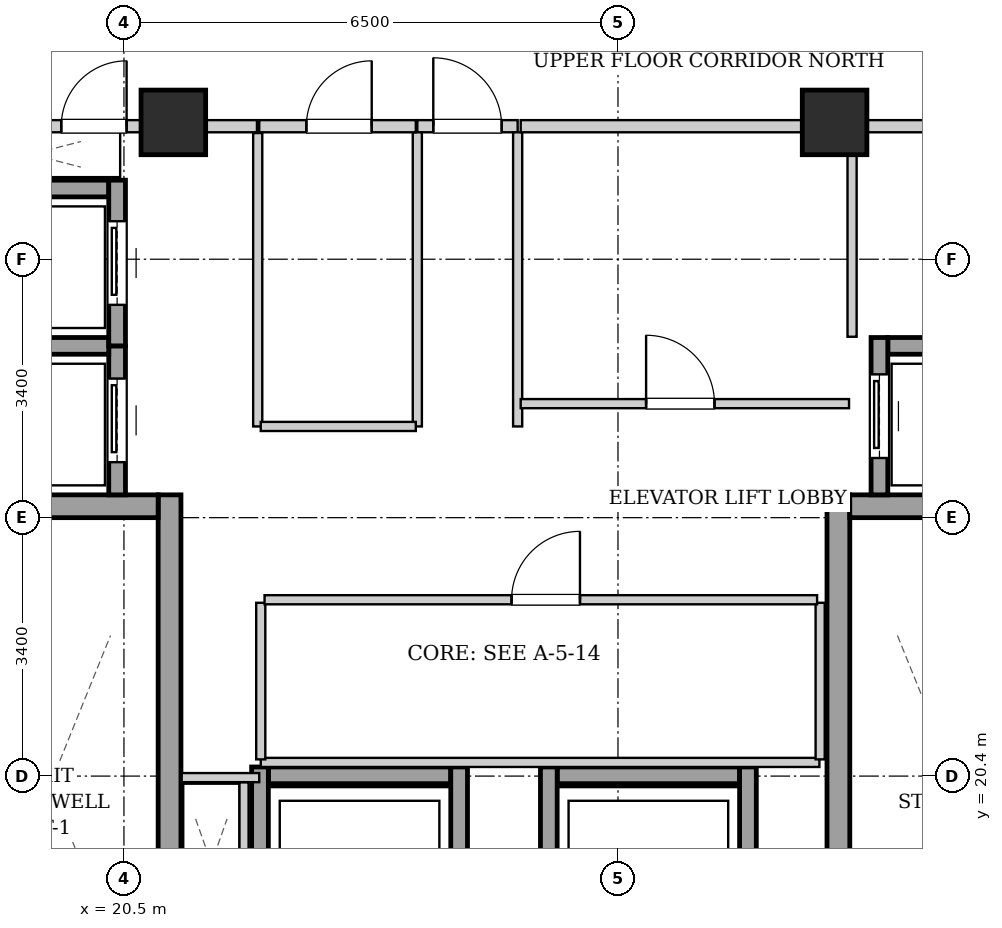
"""IFC4 building model, lengths in metres.
Left out: names, types, materials, properties, quantities, classifications, styles, units other than length and angle.
Written with IfcOpenShell. Run it as: python <this file> out.ifc"""

import sys

from ifc_helpers import new_model, si_unit, direction, frame, frame_2d, origin, origin_2d, place, context, subcontext, project, spatial, rectangle, extrude, element, fill, save


model = new_model("IFC4")
c1 = context("Model", 3, precision=1e-05, world=origin(), true_north=direction((0.0, 1.0)))
c2 = subcontext(c1, "Body", "Model", "MODEL_VIEW")
j1 = project(units=[si_unit("LENGTHUNIT", "METRE"), si_unit("PLANEANGLEUNIT", "RADIAN")], contexts=[c1])
p1 = place(None, origin())
s1 = spatial("IfcSite", under=j1, at=p1, CompositionType="ELEMENT")
p2 = place(p1, origin())
s2 = spatial("IfcBuilding", under=s1, at=p2, CompositionType="ELEMENT")
p3 = place(p2, frame((0.0, 0.0, 207.4)))
s3 = spatial("IfcBuildingStorey", under=s2, at=p3, CompositionType="ELEMENT", Elevation=207.4)
for number, where, z_axis, x_axis in (
    (1, (21.15, 29.0, 0.0), (0.0, 0.0, 1.0), (1.0, 0.0, 0.0)),
    (2, (29.85, 29.0, 0.0), (0.0, 0.0, 1.0), (1.0, 0.0, 0.0)),
):
    element("IfcColumn", number, at=place(p3, frame(where, z_axis=z_axis, x_axis=x_axis)), inside=s3, PredefinedType="COLUMN", context=c2, shape_type="SweptSolid", body=[
        extrude(rectangle(XDim=0.85, YDim=0.85, at=origin_2d()), origin(), (0.0, 0.0, 1.0), 3.3),
    ])
p4 = place(p3, frame((21.1, 15.1, 0.0), z_axis=(0.0, 0.0, 1.0), x_axis=(0.0, 1.0, 0.0)))
e3 = element("IfcWall", 3, at=p4, inside=s3, PredefinedType="SHEAR", context=c2, shape_type="SweptSolid", body=[
    extrude(rectangle(XDim=9.0, YDim=0.3, at=frame_2d((4.5, 0.0))), origin(), (0.0, 0.0, 1.0), 3.04),
])
p5 = place(p3, frame((18.1, 23.95, 0.0), z_axis=(0.0, 0.0, 1.0), x_axis=(1.0, 0.0, 0.0)))
e4 = element("IfcWall", 4, at=p5, inside=s3, PredefinedType="SHEAR", context=c2, shape_type="SweptSolid", body=[
    extrude(rectangle(XDim=2.85, YDim=0.3, at=frame_2d((1.425, 0.0))), origin(), (0.0, 0.0, 1.0), 3.04),
])
p6 = place(p3, frame((29.9, 15.1, 0.0), z_axis=(0.0, 0.0, 1.0), x_axis=(0.0, 1.0, 0.0)))
e5 = element("IfcWall", 5, at=p6, inside=s3, PredefinedType="SHEAR", context=c2, shape_type="SweptSolid", body=[
    extrude(rectangle(XDim=9.0, YDim=0.3, at=frame_2d((4.5, 0.0))), origin(), (0.0, 0.0, 1.0), 3.04),
])
p7 = place(p3, frame((30.05, 23.95, 0.0), z_axis=(0.0, 0.0, 1.0), x_axis=(1.0, 0.0, 0.0)))
e6 = element("IfcWall", 6, at=p7, inside=s3, PredefinedType="SHEAR", context=c2, shape_type="SweptSolid", body=[
    extrude(rectangle(XDim=2.85, YDim=0.3, at=frame_2d((1.425, 0.0))), origin(), (0.0, 0.0, 1.0), 3.04),
])
p8 = place(p3, frame((20.41, 24.1, 0.0), z_axis=(0.0, 0.0, 1.0), x_axis=(0.0, 1.0, 0.0)))
e7 = element("IfcWall", 7, at=p8, inside=s3, PredefinedType="SHEAR", context=c2, shape_type="SweptSolid", body=[
    extrude(rectangle(XDim=1.96, YDim=0.22, at=frame_2d((0.98, 0.0))), origin(), (0.0, 0.0, 1.0), 3.04),
])
p9 = place(p8, frame((0.43, 0.0, 0.0)))
e8 = element("IfcOpeningElement", 8, at=p9, cuts=e7, PredefinedType="OPENING", context=c2, shape_type="SweptSolid", body=[
    extrude(rectangle(XDim=1.1, YDim=2.15, at=frame_2d((0.55, 1.075))), frame((0.0, 0.12, 0.0), z_axis=(0.0, -1.0, 0.0), x_axis=(1.0, 0.0, 0.0)), (0.0, 0.0, 1.0), 0.24),
])
for number, where, z_axis, x_axis in (
    (9, (18.4, 26.06, 0.0), (0.0, 0.0, 1.0), (1.0, 0.0, 0.0)),
    (10, (18.4, 28.13, 0.0), (0.0, 0.0, 1.0), (1.0, 0.0, 0.0)),
):
    element("IfcWall", number, at=place(p3, frame(where, z_axis=z_axis, x_axis=x_axis)), inside=s3, PredefinedType="SHEAR", context=c2, shape_type="SweptSolid", body=[
        extrude(rectangle(XDim=1.9, YDim=0.22, at=frame_2d((0.95, 0.0))), origin(), (0.0, 0.0, 1.0), 3.04),
    ])
p10 = place(p3, frame((20.41, 26.06, 0.0), z_axis=(0.0, 0.0, 1.0), x_axis=(0.0, 1.0, 0.0)))
e11 = element("IfcWall", 11, at=p10, inside=s3, PredefinedType="SHEAR", context=c2, shape_type="SweptSolid", body=[
    extrude(rectangle(XDim=2.18, YDim=0.22, at=frame_2d((1.09, 0.0))), origin(), (0.0, 0.0, 1.0), 3.04),
])
p11 = place(p10, frame((0.54, 0.0, 0.0)))
e12 = element("IfcOpeningElement", 12, at=p11, cuts=e11, PredefinedType="OPENING", context=c2, shape_type="SweptSolid", body=[
    extrude(rectangle(XDim=1.1, YDim=2.15, at=frame_2d((0.55, 1.075))), frame((0.0, 0.12, 0.0), z_axis=(0.0, -1.0, 0.0), x_axis=(1.0, 0.0, 0.0)), (0.0, 0.0, 1.0), 0.24),
])
p12 = place(p3, frame((30.55, 26.06, 0.0), z_axis=(0.0, 0.0, 1.0), x_axis=(1.0, 0.0, 0.0)))
e13 = element("IfcWall", 13, at=p12, inside=s3, PredefinedType="SHEAR", context=c2, shape_type="SweptSolid", body=[
    extrude(rectangle(XDim=1.9, YDim=0.22, at=frame_2d((0.95, 0.0))), origin(), (0.0, 0.0, 1.0), 3.04),
])
p13 = place(p3, frame((30.44, 24.1, 0.0), z_axis=(0.0, 0.0, 1.0), x_axis=(0.0, 1.0, 0.0)))
e14 = element("IfcWall", 14, at=p13, inside=s3, PredefinedType="SHEAR", context=c2, shape_type="SweptSolid", body=[
    extrude(rectangle(XDim=2.07, YDim=0.22, at=frame_2d((1.035, 0.0))), origin(), (0.0, 0.0, 1.0), 3.04),
])
p14 = place(p13, frame((0.485, 0.0, 0.0)))
e15 = element("IfcOpeningElement", 15, at=p14, cuts=e14, PredefinedType="OPENING", context=c2, shape_type="SweptSolid", body=[
    extrude(rectangle(XDim=1.1, YDim=2.15, at=frame_2d((0.55, 1.075))), frame((0.0, 0.12, 0.0), z_axis=(0.0, -1.0, 0.0), x_axis=(1.0, 0.0, 0.0)), (0.0, 0.0, 1.0), 0.24),
])
p15 = place(p3, frame((22.4, 20.41, 0.0), z_axis=(0.0, 0.0, 1.0), x_axis=(1.0, 0.0, 0.0)))
e16 = element("IfcWall", 16, at=p15, inside=s3, PredefinedType="SHEAR", context=c2, shape_type="SweptSolid", body=[
    extrude(rectangle(XDim=2.4, YDim=0.22, at=frame_2d((1.2, 0.0))), origin(), (0.0, 0.0, 1.0), 3.04),
])
for number, where, z_axis, x_axis in (
    (17, (22.29, 17.98, 0.0), (0.0, 0.0, 1.0), (0.0, 1.0, 0.0)),
    (18, (24.91, 17.98, 0.0), (0.0, 0.0, 1.0), (0.0, 1.0, 0.0)),
):
    element("IfcWall", number, at=place(p3, frame(where, z_axis=z_axis, x_axis=x_axis)), inside=s3, PredefinedType="SHEAR", context=c2, shape_type="SweptSolid", body=[
        extrude(rectangle(XDim=2.54, YDim=0.22, at=frame_2d((1.27, 0.0))), origin(), (0.0, 0.0, 1.0), 3.04),
    ])
p16 = place(p3, frame((26.2, 20.41, 0.0), z_axis=(0.0, 0.0, 1.0), x_axis=(1.0, 0.0, 0.0)))
e19 = element("IfcWall", 19, at=p16, inside=s3, PredefinedType="SHEAR", context=c2, shape_type="SweptSolid", body=[
    extrude(rectangle(XDim=2.4, YDim=0.22, at=frame_2d((1.2, 0.0))), origin(), (0.0, 0.0, 1.0), 3.04),
])
for number, where, z_axis, x_axis in (
    (20, (26.09, 17.98, 0.0), (0.0, 0.0, 1.0), (0.0, 1.0, 0.0)),
    (21, (28.71, 17.98, 0.0), (0.0, 0.0, 1.0), (0.0, 1.0, 0.0)),
):
    element("IfcWall", number, at=place(p3, frame(where, z_axis=z_axis, x_axis=x_axis)), inside=s3, PredefinedType="SHEAR", context=c2, shape_type="SweptSolid", body=[
        extrude(rectangle(XDim=2.54, YDim=0.22, at=frame_2d((1.27, 0.0))), origin(), (0.0, 0.0, 1.0), 3.04),
    ])
p17 = place(p3, frame((24.36, 28.95, 0.0), z_axis=(0.0, 0.0, 1.0), x_axis=(1.0, 0.0, 0.0)))
e22 = element("IfcWall", 22, at=p17, inside=s3, PredefinedType="PARTITIONING", context=c2, shape_type="SweptSolid", body=[
    extrude(rectangle(XDim=1.32, YDim=0.16, at=frame_2d((0.66, 0.0))), origin(), (0.0, 0.0, 1.0), 2.556),
])
p18 = place(p17, frame((0.21, 0.0, 0.0)))
e23 = element("IfcOpeningElement", 23, at=p18, cuts=e22, PredefinedType="OPENING", context=c2, shape_type="SweptSolid", body=[
    extrude(rectangle(XDim=0.9, YDim=2.05, at=frame_2d((0.45, 1.025))), frame((0.0, 0.09, 0.0), z_axis=(0.0, -1.0, 0.0), x_axis=(1.0, 0.0, 0.0)), (0.0, 0.0, 1.0), 0.18),
])
p19 = place(p3, frame((17.96, 28.95, 0.0), z_axis=(0.0, 0.0, 1.0), x_axis=(1.0, 0.0, 0.0)))
e24 = element("IfcWall", 24, at=p19, inside=s3, PredefinedType="PARTITIONING", context=c2, shape_type="SweptSolid", body=[
    extrude(rectangle(XDim=4.29, YDim=0.16, at=frame_2d((2.145, 0.0))), origin(), (0.0, 0.0, 1.0), 2.556),
])
p20 = place(p19, frame((1.715, 0.0, 0.0)))
e25 = element("IfcOpeningElement", 25, at=p20, cuts=e24, PredefinedType="OPENING", context=c2, shape_type="SweptSolid", body=[
    extrude(rectangle(XDim=0.86, YDim=2.05, at=frame_2d((0.43, 1.025))), frame((0.0, 0.09, 0.0), z_axis=(0.0, -1.0, 0.0), x_axis=(1.0, 0.0, 0.0)), (0.0, 0.0, 1.0), 0.18),
])
p21 = place(p3, frame((22.08, 18.2, 0.0), z_axis=(0.0, 0.0, 1.0), x_axis=(0.0, 1.0, 0.0)))
e26 = element("IfcWall", 26, at=p21, inside=s3, PredefinedType="PARTITIONING", context=c2, shape_type="SweptSolid", body=[
    extrude(rectangle(XDim=2.12, YDim=0.12, at=frame_2d((1.06, 0.0))), origin(), (0.0, 0.0, 1.0), 3.04),
])
p22 = place(p3, frame((22.28, 20.38, 0.0), z_axis=(0.0, 0.0, 1.0), x_axis=(-1.0, 0.0, 0.0)))
e27 = element("IfcWall", 27, at=p22, inside=s3, PredefinedType="PARTITIONING", context=c2, shape_type="SweptSolid", body=[
    extrude(rectangle(XDim=1.02, YDim=0.12, at=frame_2d((0.51, 0.0))), origin(), (0.0, 0.0, 1.0), 3.04),
])
for number, where, z_axis, x_axis in (
    (28, (24.36, 25.0, 0.0), (0.0, 0.0, 1.0), (0.0, 1.0, 0.0)),
    (29, (25.68, 25.0, 0.0), (0.0, 0.0, 1.0), (0.0, 1.0, 0.0)),
):
    element("IfcWall", number, at=place(p3, frame(where, z_axis=z_axis, x_axis=x_axis)), inside=s3, PredefinedType="PARTITIONING", context=c2, shape_type="SweptSolid", body=[
        extrude(rectangle(XDim=3.87, YDim=0.12, at=frame_2d((1.935, 0.0))), origin(), (0.0, 0.0, 1.0), 3.04),
    ])
p23 = place(p3, frame((30.08, 26.18, 0.0), z_axis=(0.0, 0.0, 1.0), x_axis=(0.0, 1.0, 0.0)))
e30 = element("IfcWall", 30, at=p23, inside=s3, PredefinedType="PARTITIONING", context=c2, shape_type="SweptSolid", body=[
    extrude(rectangle(XDim=2.68, YDim=0.12, at=frame_2d((1.34, 0.0))), origin(), (0.0, 0.0, 1.0), 3.04),
])
p24 = place(p3, frame((30.08, 28.95, 0.0), z_axis=(0.0, 0.0, 1.0), x_axis=(1.0, 0.0, 0.0)))
e31 = element("IfcWall", 31, at=p24, inside=s3, PredefinedType="PARTITIONING", context=c2, shape_type="SweptSolid", body=[
    extrude(rectangle(XDim=2.96, YDim=0.16, at=frame_2d((1.48, 0.0))), origin(), (0.0, 0.0, 1.0), 3.04),
])
p25 = place(p24, frame((1.045, 0.0, 0.0)))
e32 = element("IfcOpeningElement", 32, at=p25, cuts=e31, PredefinedType="OPENING", context=c2, shape_type="SweptSolid", body=[
    extrude(rectangle(XDim=0.86, YDim=2.05, at=frame_2d((0.43, 1.025))), frame((0.0, 0.09, 0.0), z_axis=(0.0, -1.0, 0.0), x_axis=(1.0, 0.0, 0.0)), (0.0, 0.0, 1.0), 0.18),
])
p26 = place(p3, frame((22.26, 25.0, 0.0), z_axis=(0.0, 0.0, 1.0), x_axis=(0.0, 1.0, 0.0)))
e33 = element("IfcWall", 33, at=p26, inside=s3, PredefinedType="PARTITIONING", context=c2, shape_type="SweptSolid", body=[
    extrude(rectangle(XDim=3.86, YDim=0.12, at=frame_2d((1.93, 0.0))), origin(), (0.0, 0.0, 1.0), 3.04),
])
p27 = place(p3, frame((22.3, 25.0, 0.0), z_axis=(0.0, 0.0, 1.0), x_axis=(1.0, 0.0, 0.0)))
e34 = element("IfcWall", 34, at=p27, inside=s3, PredefinedType="PARTITIONING", context=c2, shape_type="SweptSolid", body=[
    extrude(rectangle(XDim=2.04, YDim=0.12, at=frame_2d((1.02, 0.0))), origin(), (0.0, 0.0, 1.0), 3.04),
])
p28 = place(p3, frame((22.28, 28.95, 0.0), z_axis=(0.0, 0.0, 1.0), x_axis=(1.0, 0.0, 0.0)))
e35 = element("IfcWall", 35, at=p28, inside=s3, PredefinedType="PARTITIONING", context=c2, shape_type="SweptSolid", body=[
    extrude(rectangle(XDim=2.06, YDim=0.16, at=frame_2d((1.03, 0.0))), origin(), (0.0, 0.0, 1.0), 2.556),
])
p29 = place(p28, frame((0.62, 0.0, 0.0)))
e36 = element("IfcOpeningElement", 36, at=p29, cuts=e35, PredefinedType="OPENING", context=c2, shape_type="SweptSolid", body=[
    extrude(rectangle(XDim=0.86, YDim=2.05, at=frame_2d((0.43, 1.025))), frame((0.0, 0.09, 0.0), z_axis=(0.0, -1.0, 0.0), x_axis=(1.0, 0.0, 0.0)), (0.0, 0.0, 1.0), 0.18),
])
p30 = place(p3, frame((25.72, 28.95, 0.0), z_axis=(0.0, 0.0, 1.0), x_axis=(1.0, 0.0, 0.0)))
e37 = element("IfcWall", 37, at=p30, inside=s3, PredefinedType="PARTITIONING", context=c2, shape_type="SweptSolid", body=[
    extrude(rectangle(XDim=4.32, YDim=0.16, at=frame_2d((2.16, 0.0))), origin(), (0.0, 0.0, 1.0), 2.556),
])
p31 = place(p3, frame((25.72, 25.3, 0.0), z_axis=(0.0, 0.0, 1.0), x_axis=(1.0, 0.0, 0.0)))
e38 = element("IfcWall", 38, at=p31, inside=s3, PredefinedType="PARTITIONING", context=c2, shape_type="SweptSolid", body=[
    extrude(rectangle(XDim=4.32, YDim=0.12, at=frame_2d((2.16, 0.0))), origin(), (0.0, 0.0, 1.0), 3.04),
])
p32 = place(p31, frame((1.65, 0.0, 0.0)))
e39 = element("IfcOpeningElement", 39, at=p32, cuts=e38, PredefinedType="OPENING", context=c2, shape_type="SweptSolid", body=[
    extrude(rectangle(XDim=0.9, YDim=2.05, at=frame_2d((0.45, 1.025))), frame((0.0, 0.07, 0.0), z_axis=(0.0, -1.0, 0.0), x_axis=(1.0, 0.0, 0.0)), (0.0, 0.0, 1.0), 0.14),
])
p33 = place(p3, frame((22.3, 20.58, 0.0), z_axis=(0.0, 0.0, 1.0), x_axis=(1.0, 0.0, 0.0)))
e40 = element("IfcWall", 40, at=p33, inside=s3, PredefinedType="PARTITIONING", context=c2, shape_type="SweptSolid", body=[
    extrude(rectangle(XDim=7.35, YDim=0.12, at=frame_2d((3.675, 0.0))), origin(), (0.0, 0.0, 1.0), 3.04),
])
for number, where, z_axis, x_axis in (
    (41, (22.3, 20.62, 0.0), (0.0, 0.0, 1.0), (0.0, 1.0, 0.0)),
    (42, (29.66, 20.62, 0.0), (0.0, 0.0, 1.0), (0.0, 1.0, 0.0)),
):
    element("IfcWall", number, at=place(p3, frame(where, z_axis=z_axis, x_axis=x_axis)), inside=s3, PredefinedType="PARTITIONING", context=c2, shape_type="SweptSolid", body=[
        extrude(rectangle(XDim=2.06, YDim=0.12, at=frame_2d((1.03, 0.0))), origin(), (0.0, 0.0, 1.0), 3.04),
    ])
p34 = place(p3, frame((22.35, 22.72, 0.0), z_axis=(0.0, 0.0, 1.0), x_axis=(1.0, 0.0, 0.0)))
e43 = element("IfcWall", 43, at=p34, inside=s3, PredefinedType="PARTITIONING", context=c2, shape_type="SweptSolid", body=[
    extrude(rectangle(XDim=7.27, YDim=0.12, at=frame_2d((3.635, 0.0))), origin(), (0.0, 0.0, 1.0), 3.04),
])
p35 = place(p34, frame((3.25, 0.0, 0.0)))
e44 = element("IfcOpeningElement", 44, at=p35, cuts=e43, PredefinedType="OPENING", context=c2, shape_type="SweptSolid", body=[
    extrude(rectangle(XDim=0.9, YDim=2.05, at=frame_2d((0.45, 1.025))), frame((0.0, 0.07, 0.0), z_axis=(0.0, -1.0, 0.0), x_axis=(1.0, 0.0, 0.0)), (0.0, 0.0, 1.0), 0.14),
])
p36 = place(p9, origin())
e45 = element("IfcDoor", 45, at=p36, inside=s3, OperationType="SLIDING_TO_LEFT", PredefinedType="DOOR", context=c2, shape_type="SweptSolid", body=[
    extrude(rectangle(XDim=1.1, YDim=2.15, at=frame_2d((0.55, 1.075))), frame((0.0, 0.025, 0.0), z_axis=(0.0, -1.0, 0.0), x_axis=(1.0, 0.0, 0.0)), (0.0, 0.0, 1.0), 0.05),
])
fill(e8, e45)
p37 = place(p11, origin())
e46 = element("IfcDoor", 46, at=p37, inside=s3, OperationType="SLIDING_TO_LEFT", PredefinedType="DOOR", context=c2, shape_type="SweptSolid", body=[
    extrude(rectangle(XDim=1.1, YDim=2.15, at=frame_2d((0.55, 1.075))), frame((0.0, 0.025, 0.0), z_axis=(0.0, -1.0, 0.0), x_axis=(1.0, 0.0, 0.0)), (0.0, 0.0, 1.0), 0.05),
])
fill(e12, e46)
p38 = place(p14, origin())
e47 = element("IfcDoor", 47, at=p38, inside=s3, OperationType="SLIDING_TO_LEFT", PredefinedType="DOOR", context=c2, shape_type="SweptSolid", body=[
    extrude(rectangle(XDim=1.1, YDim=2.15, at=frame_2d((0.55, 1.075))), frame((0.0, 0.025, 0.0), z_axis=(0.0, -1.0, 0.0), x_axis=(1.0, 0.0, 0.0)), (0.0, 0.0, 1.0), 0.05),
])
fill(e15, e47)
p39 = place(p18, origin())
e48 = element("IfcDoor", 48, at=p39, inside=s3, OperationType="SINGLE_SWING_LEFT", PredefinedType="DOOR", context=c2, shape_type="SweptSolid", body=[
    extrude(rectangle(XDim=0.9, YDim=2.05, at=frame_2d((0.45, 1.025))), frame((0.0, 0.025, 0.0), z_axis=(0.0, -1.0, 0.0), x_axis=(1.0, 0.0, 0.0)), (0.0, 0.0, 1.0), 0.05),
])
fill(e23, e48)
p40 = place(p20, origin())
e49 = element("IfcDoor", 49, at=p40, inside=s3, OperationType="SINGLE_SWING_RIGHT", PredefinedType="DOOR", context=c2, shape_type="SweptSolid", body=[
    extrude(rectangle(XDim=0.86, YDim=2.05, at=frame_2d((0.43, 1.025))), frame((0.0, 0.025, 0.0), z_axis=(0.0, -1.0, 0.0), x_axis=(1.0, 0.0, 0.0)), (0.0, 0.0, 1.0), 0.05),
])
fill(e25, e49)
p41 = place(p29, origin())
e50 = element("IfcDoor", 50, at=p41, inside=s3, OperationType="SINGLE_SWING_RIGHT", PredefinedType="DOOR", context=c2, shape_type="SweptSolid", body=[
    extrude(rectangle(XDim=0.86, YDim=2.05, at=frame_2d((0.43, 1.025))), frame((0.0, 0.025, 0.0), z_axis=(0.0, -1.0, 0.0), x_axis=(1.0, 0.0, 0.0)), (0.0, 0.0, 1.0), 0.05),
])
fill(e36, e50)
p42 = place(p32, origin())
e51 = element("IfcDoor", 51, at=p42, inside=s3, OperationType="SINGLE_SWING_LEFT", PredefinedType="DOOR", context=c2, shape_type="SweptSolid", body=[
    extrude(rectangle(XDim=0.9, YDim=2.05, at=frame_2d((0.45, 1.025))), frame((0.0, 0.025, 0.0), z_axis=(0.0, -1.0, 0.0), x_axis=(1.0, 0.0, 0.0)), (0.0, 0.0, 1.0), 0.05),
])
fill(e39, e51)
p43 = place(p35, origin())
e52 = element("IfcDoor", 52, at=p43, inside=s3, OperationType="SINGLE_SWING_RIGHT", PredefinedType="DOOR", context=c2, shape_type="SweptSolid", body=[
    extrude(rectangle(XDim=0.9, YDim=2.05, at=frame_2d((0.45, 1.025))), frame((0.0, 0.025, 0.0), z_axis=(0.0, -1.0, 0.0), x_axis=(1.0, 0.0, 0.0)), (0.0, 0.0, 1.0), 0.05),
])
fill(e44, e52)
save(model, sys.argv[1])
